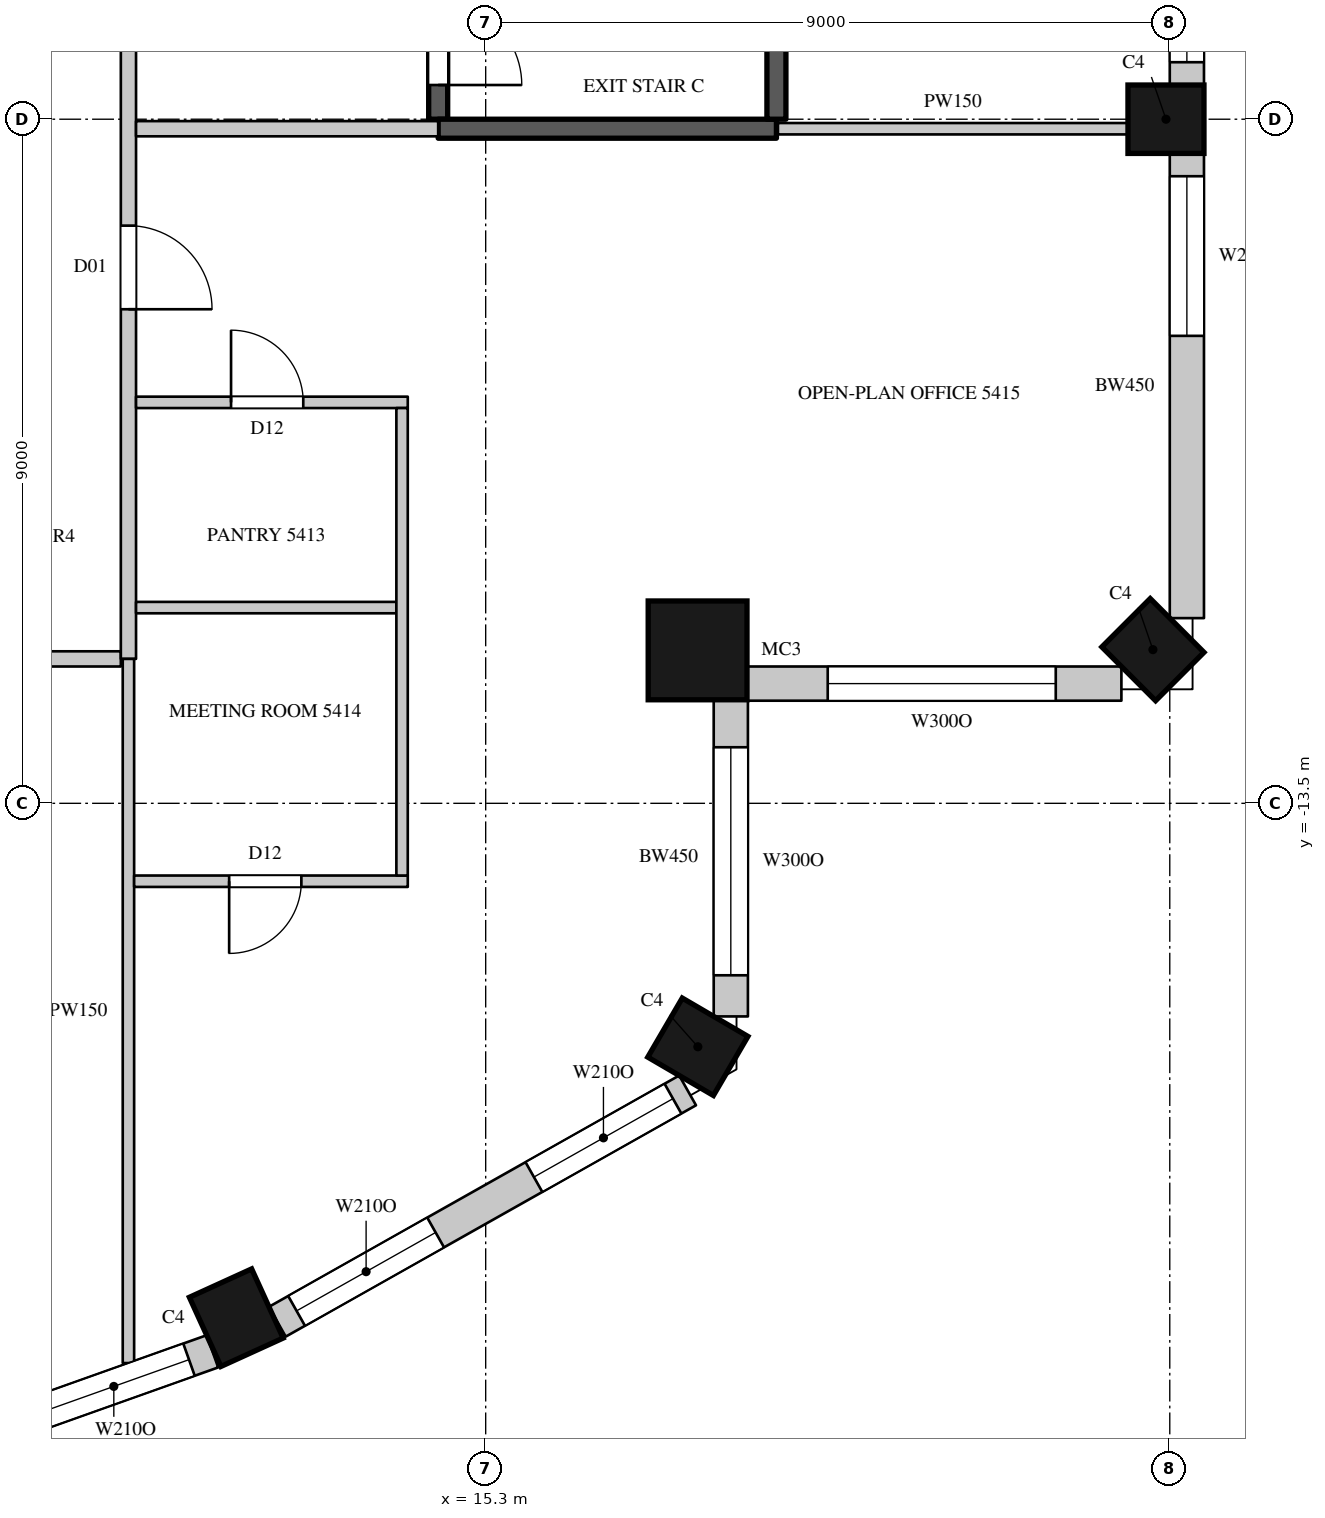
"""IFC4 building model, lengths in metres.
Left out: names, types, materials, properties, quantities, classifications, styles, units other than length and angle.
Written with IfcOpenShell. Run it as: python <this file> out.ifc"""

import sys

from ifc_helpers import new_model, si_unit, direction, frame, frame_2d, origin, origin_2d, place, context, subcontext, project, spatial, rectangle, circle, extrude, element, fill, save


model = new_model("IFC4")
c1 = context("Model", 3, precision=1e-05, world=origin(), true_north=direction((0.0, 1.0)))
c2 = subcontext(c1, "Body", "Model", "MODEL_VIEW")
j1 = project(units=[si_unit("LENGTHUNIT", "METRE"), si_unit("PLANEANGLEUNIT", "RADIAN")], contexts=[c1])
p1 = place(None, origin())
s1 = spatial("IfcSite", under=j1, at=p1, CompositionType="ELEMENT")
p2 = place(p1, origin())
s2 = spatial("IfcBuilding", under=s1, at=p2, CompositionType="ELEMENT")
p3 = place(p2, frame((0.0, 0.0, 243.4)))
s3 = spatial("IfcBuildingStorey", under=s2, at=p3, CompositionType="ELEMENT", Elevation=243.4)
for number, where, z_axis, x_axis in (
    (1, (12.019, -20.267, 0.0), (0.0, 0.0, 1.0), (0.91, 0.415, 0.0)),
    (2, (18.091, -16.703, 0.0), (0.0, 0.0, 1.0), (0.504, 0.863, 0.0)),
):
    element("IfcColumn", number, at=place(p3, frame(where, z_axis=z_axis, x_axis=x_axis)), inside=s3, PredefinedType="COLUMN", context=c2, shape_type="SweptSolid", body=[
        extrude(rectangle(XDim=0.9, YDim=1.0, at=origin_2d()), origin(), (0.0, 0.0, 1.0), 4.1),
    ])
p4 = place(p3, frame((18.088, -11.488, 0.0), z_axis=(0.0, 0.0, 1.0), x_axis=(1.0, 0.0, 0.0)))
e3 = element("IfcColumn", 3, at=p4, inside=s3, PredefinedType="COLUMN", context=c2, shape_type="SweptSolid", body=[
    extrude(circle(Radius=0.65, at=origin_2d()), origin(), (0.0, 0.0, 1.0), 4.1),
])
for number, where, z_axis, x_axis in (
    (4, (24.078, -11.478, 0.0), (0.0, 0.0, 1.0), (0.707, 0.707, 0.0)),
    (5, (24.25, -4.5, 0.0), (0.0, 0.0, 1.0), (0.0, 1.0, 0.0)),
):
    element("IfcColumn", number, at=place(p3, frame(where, z_axis=z_axis, x_axis=x_axis)), inside=s3, PredefinedType="COLUMN", context=c2, shape_type="SweptSolid", body=[
        extrude(rectangle(XDim=0.9, YDim=1.0, at=origin_2d()), origin(), (0.0, 0.0, 1.0), 4.1),
    ])
p5 = place(p3, frame((5.665, -22.859, 0.0), z_axis=(0.0, 0.0, 1.0), x_axis=(0.942108340262, 0.335308626803, 0.0)))
e6 = element("IfcWall", 6, at=p5, inside=s3, PredefinedType="SOLIDWALL", context=c2, shape_type="SweptSolid", body=[
    extrude(rectangle(XDim=6.412, YDim=0.45, at=frame_2d((3.206, 0.0))), origin(), (0.0, 0.0, 1.0), 3.8),
])
p6 = place(p5, frame((0.327, 0.0, 1.05)))
e7 = element("IfcOpeningElement", 7, at=p6, cuts=e6, PredefinedType="OPENING", context=c2, shape_type="SweptSolid", body=[
    extrude(rectangle(XDim=2.1, YDim=2.4, at=frame_2d((1.05, 1.2))), frame((0.0, 0.235, 0.0), z_axis=(0.0, -1.0, 0.0), x_axis=(1.0, 0.0, 0.0)), (0.0, 0.0, 1.0), 0.47),
])
p7 = place(p5, frame((3.985, 0.0, 1.05)))
e8 = element("IfcOpeningElement", 8, at=p7, cuts=e6, PredefinedType="OPENING", context=c2, shape_type="SweptSolid", body=[
    extrude(rectangle(XDim=2.1, YDim=2.4, at=frame_2d((1.05, 1.2))), frame((0.0, 0.235, 0.0), z_axis=(0.0, -1.0, 0.0), x_axis=(1.0, 0.0, 0.0)), (0.0, 0.0, 1.0), 0.47),
])
p8 = place(p3, frame((12.559, -20.32, 0.0), z_axis=(0.0, 0.0, 1.0), x_axis=(0.871065783524, 0.491166367714, 0.0)))
e9 = element("IfcWall", 9, at=p8, inside=s3, PredefinedType="SOLIDWALL", context=c2, shape_type="SweptSolid", body=[
    extrude(rectangle(XDim=6.196, YDim=0.45, at=frame_2d((3.098, 0.0))), origin(), (0.0, 0.0, 1.0), 3.8),
])
p9 = place(p8, frame((0.291, 0.0, 1.05)))
e10 = element("IfcOpeningElement", 10, at=p9, cuts=e9, PredefinedType="OPENING", context=c2, shape_type="SweptSolid", body=[
    extrude(rectangle(XDim=2.1, YDim=2.4, at=frame_2d((1.05, 1.2))), frame((0.0, 0.235, 0.0), z_axis=(0.0, -1.0, 0.0), x_axis=(1.0, 0.0, 0.0)), (0.0, 0.0, 1.0), 0.47),
])
p10 = place(p8, frame((3.875, 0.0, 1.05)))
e11 = element("IfcOpeningElement", 11, at=p10, cuts=e9, PredefinedType="OPENING", context=c2, shape_type="SweptSolid", body=[
    extrude(rectangle(XDim=2.1, YDim=2.4, at=frame_2d((1.05, 1.2))), frame((0.0, 0.235, 0.0), z_axis=(0.0, -1.0, 0.0), x_axis=(1.0, 0.0, 0.0)), (0.0, 0.0, 1.0), 0.47),
])
p11 = place(p3, frame((18.525, -16.304, 0.0), z_axis=(0.0, 0.0, 1.0), x_axis=(0.0, 1.0, 0.0)))
e12 = element("IfcWall", 12, at=p11, inside=s3, PredefinedType="SOLIDWALL", context=c2, shape_type="SweptSolid", body=[
    extrude(rectangle(XDim=4.202, YDim=0.45, at=frame_2d((2.101, 0.0))), origin(), (0.0, 0.0, 1.0), 3.8),
])
p12 = place(p11, frame((0.541, 0.0, 1.05)))
e13 = element("IfcOpeningElement", 13, at=p12, cuts=e12, PredefinedType="OPENING", context=c2, shape_type="SweptSolid", body=[
    extrude(rectangle(XDim=3.0, YDim=2.4, at=frame_2d((1.5, 1.2))), frame((0.0, 0.235, 0.0), z_axis=(0.0, -1.0, 0.0), x_axis=(1.0, 0.0, 0.0)), (0.0, 0.0, 1.0), 0.47),
])
p13 = place(p3, frame((18.701, -11.925, 0.0), z_axis=(0.0, 0.0, 1.0), x_axis=(1.0, 0.0, 0.0)))
e14 = element("IfcWall", 14, at=p13, inside=s3, PredefinedType="SOLIDWALL", context=c2, shape_type="SweptSolid", body=[
    extrude(rectangle(XDim=4.962, YDim=0.45, at=frame_2d((2.481, 0.0))), origin(), (0.0, 0.0, 1.0), 3.8),
])
p14 = place(p13, frame((1.098, 0.0, 1.05)))
e15 = element("IfcOpeningElement", 15, at=p14, cuts=e14, PredefinedType="OPENING", context=c2, shape_type="SweptSolid", body=[
    extrude(rectangle(XDim=3.0, YDim=2.4, at=frame_2d((1.5, 1.2))), frame((0.0, 0.235, 0.0), z_axis=(0.0, -1.0, 0.0), x_axis=(1.0, 0.0, 0.0)), (0.0, 0.0, 1.0), 0.47),
])
p15 = place(p3, frame((24.525, -11.064, 0.0), z_axis=(0.0, 0.0, 1.0), x_axis=(0.0, 1.0, 0.0)))
e16 = element("IfcWall", 16, at=p15, inside=s3, PredefinedType="SOLIDWALL", context=c2, shape_type="SweptSolid", body=[
    extrude(rectangle(XDim=6.114, YDim=0.45, at=frame_2d((3.057, 0.0))), origin(), (0.0, 0.0, 1.0), 3.8),
])
p16 = place(p15, frame((3.714, 0.0, 1.05)))
e17 = element("IfcOpeningElement", 17, at=p16, cuts=e16, PredefinedType="OPENING", context=c2, shape_type="SweptSolid", body=[
    extrude(rectangle(XDim=2.1, YDim=2.4, at=frame_2d((1.05, 1.2))), frame((0.0, 0.235, 0.0), z_axis=(0.0, -1.0, 0.0), x_axis=(1.0, 0.0, 0.0)), (0.0, 0.0, 1.0), 0.47),
])
p17 = place(p3, frame((24.525, -4.05, 0.0), z_axis=(0.0, 0.0, 1.0), x_axis=(0.0, 1.0, 0.0)))
e18 = element("IfcWall", 18, at=p17, inside=s3, PredefinedType="SOLIDWALL", context=c2, shape_type="SweptSolid", body=[
    extrude(rectangle(XDim=8.1, YDim=0.45, at=frame_2d((4.05, 0.0))), origin(), (0.0, 0.0, 1.0), 3.8),
])
p18 = place(p17, frame((0.3, 0.0, 1.05)))
e19 = element("IfcOpeningElement", 19, at=p18, cuts=e18, PredefinedType="OPENING", context=c2, shape_type="SweptSolid", body=[
    extrude(rectangle(XDim=3.0, YDim=2.4, at=frame_2d((1.5, 1.2))), frame((0.0, 0.235, 0.0), z_axis=(0.0, -1.0, 0.0), x_axis=(1.0, 0.0, 0.0)), (0.0, 0.0, 1.0), 0.47),
])
p19 = place(p17, frame((4.8, 0.0, 1.05)))
e20 = element("IfcOpeningElement", 20, at=p19, cuts=e18, PredefinedType="OPENING", context=c2, shape_type="SweptSolid", body=[
    extrude(rectangle(XDim=3.0, YDim=2.4, at=frame_2d((1.5, 1.2))), frame((0.0, 0.235, 0.0), z_axis=(0.0, -1.0, 0.0), x_axis=(1.0, 0.0, 0.0)), (0.0, 0.0, 1.0), 0.47),
])
p20 = place(p3, frame((-10.9, -11.6, 0.0), z_axis=(0.0, 0.0, 1.0), x_axis=(1.0, 0.0, 0.0)))
e21 = element("IfcWall", 21, at=p20, inside=s3, PredefinedType="PARTITIONING", context=c2, shape_type="SweptSolid", body=[
    extrude(rectangle(XDim=21.4, YDim=0.2, at=frame_2d((10.7, 0.0))), origin(), (0.0, 0.0, 1.0), 3.8),
])
p21 = place(p20, frame((0.95, 0.0, 0.0)))
e22 = element("IfcOpeningElement", 22, at=p21, cuts=e21, PredefinedType="OPENING", context=c2, shape_type="SweptSolid", body=[
    extrude(rectangle(XDim=0.9, YDim=2.2, at=frame_2d((0.45, 1.1))), frame((0.0, 0.11, 0.0), z_axis=(0.0, -1.0, 0.0), x_axis=(1.0, 0.0, 0.0)), (0.0, 0.0, 1.0), 0.22),
])
p22 = place(p20, frame((4.2, 0.0, 0.0)))
e23 = element("IfcOpeningElement", 23, at=p22, cuts=e21, PredefinedType="OPENING", context=c2, shape_type="SweptSolid", body=[
    extrude(rectangle(XDim=0.9, YDim=2.2, at=frame_2d((0.45, 1.1))), frame((0.0, 0.11, 0.0), z_axis=(0.0, -1.0, 0.0), x_axis=(1.0, 0.0, 0.0)), (0.0, 0.0, 1.0), 0.22),
])
p23 = place(p20, frame((6.85, 0.0, 0.0)))
e24 = element("IfcOpeningElement", 24, at=p23, cuts=e21, PredefinedType="OPENING", context=c2, shape_type="SweptSolid", body=[
    extrude(rectangle(XDim=1.1, YDim=2.4, at=frame_2d((0.55, 1.2))), frame((0.0, 0.11, 0.0), z_axis=(0.0, -1.0, 0.0), x_axis=(1.0, 0.0, 0.0)), (0.0, 0.0, 1.0), 0.22),
])
p24 = place(p20, frame((9.8, 0.0, 0.0)))
e25 = element("IfcOpeningElement", 25, at=p24, cuts=e21, PredefinedType="OPENING", context=c2, shape_type="SweptSolid", body=[
    extrude(rectangle(XDim=1.1, YDim=2.4, at=frame_2d((0.55, 1.2))), frame((0.0, 0.11, 0.0), z_axis=(0.0, -1.0, 0.0), x_axis=(1.0, 0.0, 0.0)), (0.0, 0.0, 1.0), 0.22),
])
p25 = place(p3, frame((10.6, -11.6, 0.0), z_axis=(0.0, 0.0, 1.0), x_axis=(0.0, 1.0, 0.0)))
e26 = element("IfcWall", 26, at=p25, inside=s3, PredefinedType="PARTITIONING", context=c2, shape_type="SweptSolid", body=[
    extrude(rectangle(XDim=23.7, YDim=0.2, at=frame_2d((11.85, 0.0))), origin(), (0.0, 0.0, 1.0), 3.8),
])
p26 = place(p25, frame((9.45, 0.0, 0.0)))
e27 = element("IfcOpeningElement", 27, at=p26, cuts=e26, PredefinedType="OPENING", context=c2, shape_type="SweptSolid", body=[
    extrude(rectangle(XDim=1.5, YDim=2.4, at=frame_2d((0.75, 1.2))), frame((0.0, 0.11, 0.0), z_axis=(0.0, -1.0, 0.0), x_axis=(1.0, 0.0, 0.0)), (0.0, 0.0, 1.0), 0.22),
])
p27 = place(p25, frame((19.45, 0.0, 0.0)))
e28 = element("IfcOpeningElement", 28, at=p27, cuts=e26, PredefinedType="OPENING", context=c2, shape_type="SweptSolid", body=[
    extrude(rectangle(XDim=1.1, YDim=2.4, at=frame_2d((0.55, 1.2))), frame((0.0, 0.11, 0.0), z_axis=(0.0, -1.0, 0.0), x_axis=(1.0, 0.0, 0.0)), (0.0, 0.0, 1.0), 0.22),
])
p28 = place(p25, frame((4.6, 0.0, 0.0)))
e29 = element("IfcOpeningElement", 29, at=p28, cuts=e26, PredefinedType="OPENING", context=c2, shape_type="SweptSolid", body=[
    extrude(rectangle(XDim=1.1, YDim=2.4, at=frame_2d((0.55, 1.2))), frame((0.0, 0.11, 0.0), z_axis=(0.0, -1.0, 0.0), x_axis=(1.0, 0.0, 0.0)), (0.0, 0.0, 1.0), 0.22),
])
p29 = place(p3, frame((10.7, -4.625, 0.0), z_axis=(0.0, 0.0, 1.0), x_axis=(1.0, 0.0, 0.0)))
e30 = element("IfcWall", 30, at=p29, inside=s3, PredefinedType="PARTITIONING", context=c2, shape_type="SweptSolid", body=[
    extrude(rectangle(XDim=3.975, YDim=0.2, at=frame_2d((1.988, 0.0))), origin(), (0.0, 0.0, 1.0), 3.8),
])
p30 = place(p3, frame((10.6, -20.864, 0.0), z_axis=(0.0, 0.0, 1.0), x_axis=(0.0, 1.0, 0.0)))
e31 = element("IfcWall", 31, at=p30, inside=s3, PredefinedType="PARTITIONING", context=c2, shape_type="SweptSolid", body=[
    extrude(rectangle(XDim=9.264, YDim=0.15, at=frame_2d((4.632, 0.0))), origin(), (0.0, 0.0, 1.0), 3.8),
])
p31 = place(p3, frame((10.675, -14.525, 0.0), z_axis=(0.0, 0.0, 1.0), x_axis=(1.0, 0.0, 0.0)))
e32 = element("IfcWall", 32, at=p31, inside=s3, PredefinedType="PARTITIONING", context=c2, shape_type="SweptSolid", body=[
    extrude(rectangle(XDim=3.6, YDim=0.15, at=frame_2d((1.8, 0.0))), origin(), (0.0, 0.0, 1.0), 3.8),
])
p32 = place(p31, frame((1.25, 0.0, 0.0)))
e33 = element("IfcOpeningElement", 33, at=p32, cuts=e32, PredefinedType="OPENING", context=c2, shape_type="SweptSolid", body=[
    extrude(rectangle(XDim=0.95, YDim=2.2, at=frame_2d((0.475, 1.1))), frame((0.0, 0.085, 0.0), z_axis=(0.0, -1.0, 0.0), x_axis=(1.0, 0.0, 0.0)), (0.0, 0.0, 1.0), 0.17),
])
p33 = place(p3, frame((10.7, -10.925, 0.0), z_axis=(0.0, 0.0, 1.0), x_axis=(1.0, 0.0, 0.0)))
e34 = element("IfcWall", 34, at=p33, inside=s3, PredefinedType="PARTITIONING", context=c2, shape_type="SweptSolid", body=[
    extrude(rectangle(XDim=3.425, YDim=0.15, at=frame_2d((1.712, 0.0))), origin(), (0.0, 0.0, 1.0), 3.8),
])
p34 = place(p3, frame((10.7, -8.225, 0.0), z_axis=(0.0, 0.0, 1.0), x_axis=(1.0, 0.0, 0.0)))
e35 = element("IfcWall", 35, at=p34, inside=s3, PredefinedType="PARTITIONING", context=c2, shape_type="SweptSolid", body=[
    extrude(rectangle(XDim=3.575, YDim=0.15, at=frame_2d((1.788, 0.0))), origin(), (0.0, 0.0, 1.0), 3.15),
])
p35 = place(p34, frame((1.25, 0.0, 0.0)))
e36 = element("IfcOpeningElement", 36, at=p35, cuts=e35, PredefinedType="OPENING", context=c2, shape_type="SweptSolid", body=[
    extrude(rectangle(XDim=0.95, YDim=2.2, at=frame_2d((0.475, 1.1))), frame((0.0, 0.085, 0.0), z_axis=(0.0, -1.0, 0.0), x_axis=(1.0, 0.0, 0.0)), (0.0, 0.0, 1.0), 0.17),
])
p36 = place(p3, frame((14.2, -14.45, 0.0), z_axis=(0.0, 0.0, 1.0), x_axis=(0.0, 1.0, 0.0)))
e37 = element("IfcWall", 37, at=p36, inside=s3, PredefinedType="PARTITIONING", context=c2, shape_type="SweptSolid", body=[
    extrude(rectangle(XDim=6.15, YDim=0.15, at=frame_2d((3.075, 0.0))), origin(), (0.0, 0.0, 1.0), 3.8),
])
p37 = place(p3, frame((19.145, -4.625, 0.0), z_axis=(0.0, 0.0, 1.0), x_axis=(1.0, 0.0, 0.0)))
e38 = element("IfcWall", 38, at=p37, inside=s3, PredefinedType="PARTITIONING", context=c2, shape_type="SweptSolid", body=[
    extrude(rectangle(XDim=4.605, YDim=0.15, at=frame_2d((2.302, 0.0))), origin(), (0.0, 0.0, 1.0), 3.8),
])
p38 = place(p3, frame((14.675, -4.5, 0.0), z_axis=(0.0, 0.0, 1.0), x_axis=(0.0, 1.0, 0.0)))
e39 = element("IfcWall", 39, at=p38, inside=s3, PredefinedType="SHEAR", context=c2, shape_type="SweptSolid", body=[
    extrude(rectangle(XDim=9.0, YDim=0.25, at=frame_2d((4.5, 0.0))), origin(), (0.0, 0.0, 1.0), 3.8),
])
p39 = place(p38, frame((0.45, 0.0, 0.0)))
e40 = element("IfcOpeningElement", 40, at=p39, cuts=e39, PredefinedType="OPENING", context=c2, shape_type="SweptSolid", body=[
    extrude(rectangle(XDim=1.1, YDim=2.2, at=frame_2d((0.55, 1.1))), frame((0.0, 0.135, 0.0), z_axis=(0.0, -1.0, 0.0), x_axis=(1.0, 0.0, 0.0)), (0.0, 0.0, 1.0), 0.27),
])
p40 = place(p3, frame((14.675, -4.625, 0.0), z_axis=(0.0, 0.0, 1.0), x_axis=(1.0, 0.0, 0.0)))
e41 = element("IfcWall", 41, at=p40, inside=s3, PredefinedType="SHEAR", context=c2, shape_type="SweptSolid", body=[
    extrude(rectangle(XDim=4.45, YDim=0.25, at=frame_2d((2.225, 0.0))), origin(), (0.0, 0.0, 1.0), 3.8),
])
p41 = place(p3, frame((19.125, -4.5, 0.0), z_axis=(0.0, 0.0, 1.0), x_axis=(0.0, 1.0, 0.0)))
e42 = element("IfcWall", 42, at=p41, inside=s3, PredefinedType="SHEAR", context=c2, shape_type="SweptSolid", body=[
    extrude(rectangle(XDim=9.0, YDim=0.25, at=frame_2d((4.5, 0.0))), origin(), (0.0, 0.0, 1.0), 3.8),
])
p42 = place(p7, origin())
e43 = element("IfcWindow", 43, at=p42, inside=s3, PartitioningType="SINGLE_PANEL", PredefinedType="WINDOW", context=c2, shape_type="SweptSolid", body=[
    extrude(rectangle(XDim=2.1, YDim=2.4, at=frame_2d((1.05, 1.2))), frame((0.0, 0.135, 0.0), z_axis=(0.0, -1.0, 0.0), x_axis=(1.0, 0.0, 0.0)), (0.0, 0.0, 1.0), 0.06),
])
fill(e8, e43)
p43 = place(p9, origin())
e44 = element("IfcWindow", 44, at=p43, inside=s3, PartitioningType="SINGLE_PANEL", PredefinedType="WINDOW", context=c2, shape_type="SweptSolid", body=[
    extrude(rectangle(XDim=2.1, YDim=2.4, at=frame_2d((1.05, 1.2))), frame((0.0, 0.135, 0.0), z_axis=(0.0, -1.0, 0.0), x_axis=(1.0, 0.0, 0.0)), (0.0, 0.0, 1.0), 0.06),
])
fill(e10, e44)
p44 = place(p10, origin())
e45 = element("IfcWindow", 45, at=p44, inside=s3, PartitioningType="SINGLE_PANEL", PredefinedType="WINDOW", context=c2, shape_type="SweptSolid", body=[
    extrude(rectangle(XDim=2.1, YDim=2.4, at=frame_2d((1.05, 1.2))), frame((0.0, 0.135, 0.0), z_axis=(0.0, -1.0, 0.0), x_axis=(1.0, 0.0, 0.0)), (0.0, 0.0, 1.0), 0.06),
])
fill(e11, e45)
p45 = place(p12, origin())
e46 = element("IfcWindow", 46, at=p45, inside=s3, PartitioningType="SINGLE_PANEL", PredefinedType="WINDOW", context=c2, shape_type="SweptSolid", body=[
    extrude(rectangle(XDim=3.0, YDim=2.4, at=frame_2d((1.5, 1.2))), frame((0.0, 0.135, 0.0), z_axis=(0.0, -1.0, 0.0), x_axis=(1.0, 0.0, 0.0)), (0.0, 0.0, 1.0), 0.06),
])
fill(e13, e46)
p46 = place(p14, origin())
e47 = element("IfcWindow", 47, at=p46, inside=s3, PartitioningType="SINGLE_PANEL", PredefinedType="WINDOW", context=c2, shape_type="SweptSolid", body=[
    extrude(rectangle(XDim=3.0, YDim=2.4, at=frame_2d((1.5, 1.2))), frame((0.0, 0.135, 0.0), z_axis=(0.0, -1.0, 0.0), x_axis=(1.0, 0.0, 0.0)), (0.0, 0.0, 1.0), 0.06),
])
fill(e15, e47)
p47 = place(p16, origin())
e48 = element("IfcWindow", 48, at=p47, inside=s3, PartitioningType="SINGLE_PANEL", PredefinedType="WINDOW", context=c2, shape_type="SweptSolid", body=[
    extrude(rectangle(XDim=2.1, YDim=2.4, at=frame_2d((1.05, 1.2))), frame((0.0, 0.135, 0.0), z_axis=(0.0, -1.0, 0.0), x_axis=(1.0, 0.0, 0.0)), (0.0, 0.0, 1.0), 0.06),
])
fill(e17, e48)
p48 = place(p18, origin())
e49 = element("IfcWindow", 49, at=p48, inside=s3, PartitioningType="SINGLE_PANEL", PredefinedType="WINDOW", context=c2, shape_type="SweptSolid", body=[
    extrude(rectangle(XDim=3.0, YDim=2.4, at=frame_2d((1.5, 1.2))), frame((0.0, 0.135, 0.0), z_axis=(0.0, -1.0, 0.0), x_axis=(1.0, 0.0, 0.0)), (0.0, 0.0, 1.0), 0.06),
])
fill(e19, e49)
p49 = place(p28, origin())
e50 = element("IfcDoor", 50, at=p49, inside=s3, OperationType="SINGLE_SWING_RIGHT", PredefinedType="DOOR", context=c2, shape_type="SweptSolid", body=[
    extrude(rectangle(XDim=1.1, YDim=2.4, at=frame_2d((0.55, 1.2))), frame((0.0, 0.025, 0.0), z_axis=(0.0, -1.0, 0.0), x_axis=(1.0, 0.0, 0.0)), (0.0, 0.0, 1.0), 0.05),
])
fill(e29, e50)
p50 = place(p35, origin())
e51 = element("IfcDoor", 51, at=p50, inside=s3, OperationType="SINGLE_SWING_LEFT", PredefinedType="DOOR", context=c2, shape_type="SweptSolid", body=[
    extrude(rectangle(XDim=0.95, YDim=2.2, at=frame_2d((0.475, 1.1))), frame((0.0, 0.025, 0.0), z_axis=(0.0, -1.0, 0.0), x_axis=(1.0, 0.0, 0.0)), (0.0, 0.0, 1.0), 0.05),
])
fill(e36, e51)
p51 = place(p32, origin())
e52 = element("IfcDoor", 52, at=p51, inside=s3, OperationType="SINGLE_SWING_RIGHT", PredefinedType="DOOR", context=c2, shape_type="SweptSolid", body=[
    extrude(rectangle(XDim=0.95, YDim=2.2, at=frame_2d((0.475, 1.1))), frame((0.0, 0.025, 0.0), z_axis=(0.0, -1.0, 0.0), x_axis=(1.0, 0.0, 0.0)), (0.0, 0.0, 1.0), 0.05),
])
fill(e33, e52)
p52 = place(p39, origin())
e53 = element("IfcDoor", 53, at=p52, inside=s3, OperationType="SINGLE_SWING_RIGHT", PredefinedType="DOOR", context=c2, shape_type="SweptSolid", body=[
    extrude(rectangle(XDim=1.1, YDim=2.2, at=frame_2d((0.55, 1.1))), frame((0.0, 0.025, 0.0), z_axis=(0.0, -1.0, 0.0), x_axis=(1.0, 0.0, 0.0)), (0.0, 0.0, 1.0), 0.05),
])
fill(e40, e53)
save(model, sys.argv[1])
